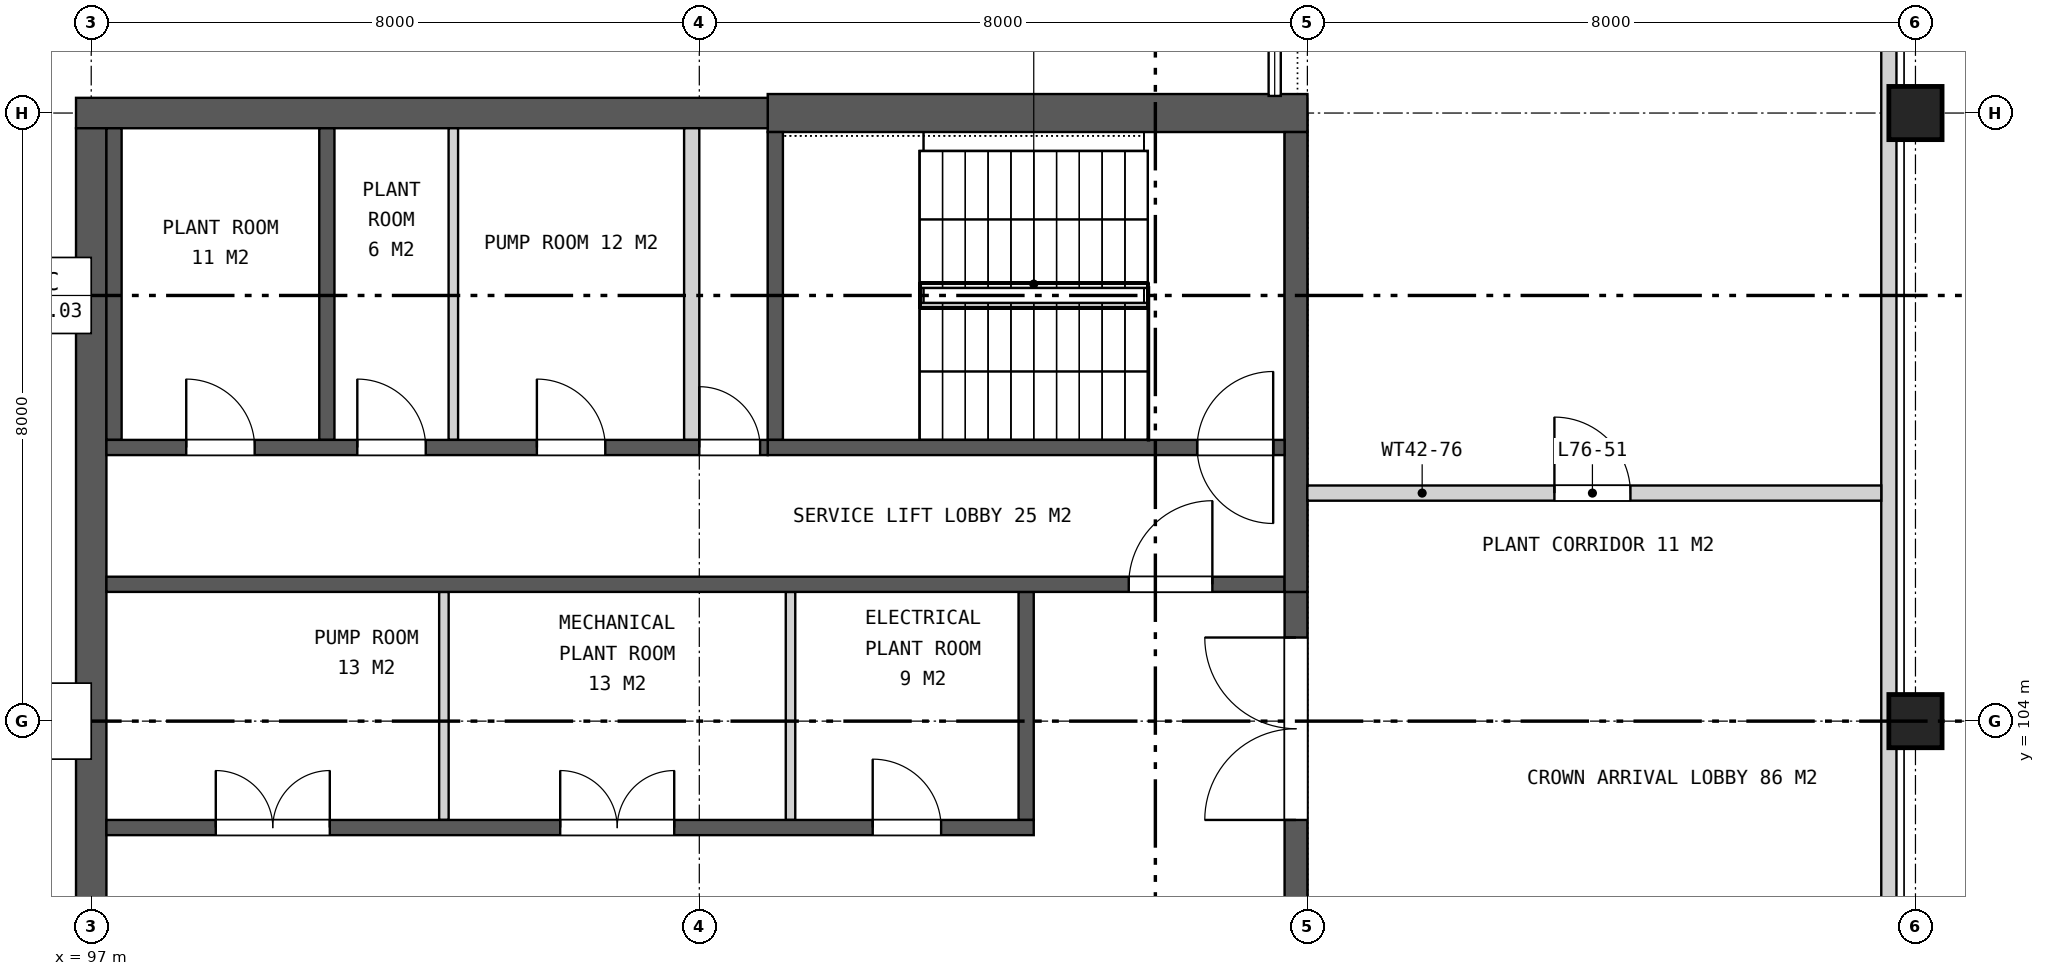
"""IFC4 building model, lengths in metres.
Left out: names, types, materials, properties, quantities, classifications, styles, units other than length and angle.
Written with IfcOpenShell. Run it as: python <this file> out.ifc"""

import sys

from ifc_helpers import new_model, si_unit, direction, frame, frame_2d, origin, origin_2d, place, context, subcontext, project, spatial, rectangle, extrude, element, fill, save


model = new_model("IFC4")
c1 = context("Model", 3, precision=1e-05, world=origin(), true_north=direction((0.0, 1.0)))
c2 = subcontext(c1, "Body", "Model", "MODEL_VIEW")
j1 = project(units=[si_unit("LENGTHUNIT", "METRE"), si_unit("PLANEANGLEUNIT", "RADIAN")], contexts=[c1])
p1 = place(None, origin())
s1 = spatial("IfcSite", under=j1, at=p1, CompositionType="ELEMENT")
p2 = place(p1, origin())
s2 = spatial("IfcBuilding", under=s1, at=p2, CompositionType="ELEMENT")
p3 = place(p2, frame((0.0, 0.0, 349.1)))
s3 = spatial("IfcBuildingStorey", under=s2, at=p3, CompositionType="ELEMENT", Elevation=349.1)
for number, where, z_axis, x_axis in (
    (1, (121.0, 104.0, 0.0), (0.0, 0.0, 1.0), (1.0, 0.0, 0.0)),
    (2, (121.0, 112.0, 0.0), (0.0, 0.0, 1.0), (1.0, 0.0, 0.0)),
):
    element("IfcColumn", number, at=place(p3, frame(where, z_axis=z_axis, x_axis=x_axis)), inside=s3, PredefinedType="COLUMN", context=c2, shape_type="SweptSolid", body=[
        extrude(rectangle(XDim=0.7, YDim=0.7, at=origin_2d()), origin(), (0.0, 0.0, 1.0), 10.23),
    ])
p4 = place(p3, frame((113.0, 112.0, 0.0), z_axis=(0.0, 0.0, 1.0), x_axis=(-1.0, 0.0, 0.0)))
e3 = element("IfcWall", 3, at=p4, inside=s3, PredefinedType="SHEAR", context=c2, shape_type="SweptSolid", body=[
    extrude(rectangle(XDim=7.1, YDim=0.5, at=frame_2d((3.55, 0.0))), origin(), (0.0, 0.0, 1.0), 12.0),
])
p5 = place(p3, frame((105.9, 112.0, 0.0), z_axis=(0.0, 0.0, 1.0), x_axis=(-1.0, 0.0, 0.0)))
e4 = element("IfcWall", 4, at=p5, inside=s3, PredefinedType="SHEAR", context=c2, shape_type="SweptSolid", body=[
    extrude(rectangle(XDim=9.1, YDim=0.4, at=frame_2d((4.55, 0.0))), origin(), (0.0, 0.0, 1.0), 12.0),
])
p6 = place(p3, frame((97.0, 111.8, 0.0), z_axis=(0.0, 0.0, 1.0), x_axis=(0.0, -1.0, 0.0)))
e5 = element("IfcWall", 5, at=p6, inside=s3, PredefinedType="SHEAR", context=c2, shape_type="SweptSolid", body=[
    extrude(rectangle(XDim=23.6, YDim=0.4, at=frame_2d((11.8, 0.0))), origin(), (0.0, 0.0, 1.0), 12.0),
])
p7 = place(p3, frame((112.85, 105.7, 0.0), z_axis=(0.0, 0.0, 1.0), x_axis=(0.0, -1.0, 0.0)))
e6 = element("IfcWall", 6, at=p7, inside=s3, PredefinedType="SHEAR", context=c2, shape_type="SweptSolid", body=[
    extrude(rectangle(XDim=11.4, YDim=0.3, at=frame_2d((5.7, 0.0))), origin(), (0.0, 0.0, 1.0), 12.0),
])
p8 = place(p7, frame((0.6, 0.0, 0.0)))
e7 = element("IfcOpeningElement", 7, at=p8, cuts=e6, PredefinedType="OPENING", context=c2, shape_type="SweptSolid", body=[
    extrude(rectangle(XDim=2.4, YDim=2.4, at=frame_2d((1.2, 1.2))), frame((0.0, 0.16, 0.0), z_axis=(0.0, -1.0, 0.0), x_axis=(1.0, 0.0, 0.0)), (0.0, 0.0, 1.0), 0.32),
])
p9 = place(p7, frame((4.5, 0.0, 0.0)))
e8 = element("IfcOpeningElement", 8, at=p9, cuts=e6, PredefinedType="OPENING", context=c2, shape_type="SweptSolid", body=[
    extrude(rectangle(XDim=2.4, YDim=2.4, at=frame_2d((1.2, 1.2))), frame((0.0, 0.16, 0.0), z_axis=(0.0, -1.0, 0.0), x_axis=(1.0, 0.0, 0.0)), (0.0, 0.0, 1.0), 0.32),
])
p10 = place(p7, frame((8.4, 0.0, 0.0)))
e9 = element("IfcOpeningElement", 9, at=p10, cuts=e6, PredefinedType="OPENING", context=c2, shape_type="SweptSolid", body=[
    extrude(rectangle(XDim=2.4, YDim=2.4, at=frame_2d((1.2, 1.2))), frame((0.0, 0.16, 0.0), z_axis=(0.0, -1.0, 0.0), x_axis=(1.0, 0.0, 0.0)), (0.0, 0.0, 1.0), 0.32),
])
p11 = place(p3, frame((109.3, 105.7, 0.0), z_axis=(0.0, 0.0, 1.0), x_axis=(0.0, -1.0, 0.0)))
e10 = element("IfcWall", 10, at=p11, inside=s3, PredefinedType="SHEAR", context=c2, shape_type="SweptSolid", body=[
    extrude(rectangle(XDim=3.0, YDim=0.2, at=frame_2d((1.5, 0.0))), origin(), (0.0, 0.0, 1.0), 9.2),
])
for number, where, z_axis, x_axis in (
    (11, (106.2, 105.7, 0.0), (0.0, 0.0, 1.0), (0.0, -1.0, 0.0)),
    (12, (101.64, 105.7, 0.0), (0.0, 0.0, 1.0), (0.0, -1.0, 0.0)),
):
    element("IfcWall", number, at=place(p3, frame(where, z_axis=z_axis, x_axis=x_axis)), inside=s3, PredefinedType="PARTITIONING", context=c2, shape_type="SweptSolid", body=[
        extrude(rectangle(XDim=3.0, YDim=0.125, at=frame_2d((1.5, 0.0))), origin(), (0.0, 0.0, 1.0), 9.2),
    ])
p12 = place(p3, frame((109.4, 102.6, 0.0), z_axis=(0.0, 0.0, 1.0), x_axis=(-1.0, 0.0, 0.0)))
e13 = element("IfcWall", 13, at=p12, inside=s3, PredefinedType="SHEAR", context=c2, shape_type="SweptSolid", body=[
    extrude(rectangle(XDim=12.2, YDim=0.2, at=frame_2d((6.1, 0.0))), origin(), (0.0, 0.0, 1.0), 9.2),
])
p13 = place(p12, frame((1.219, 0.0, 0.0)))
e14 = element("IfcOpeningElement", 14, at=p13, cuts=e13, PredefinedType="OPENING", context=c2, shape_type="SweptSolid", body=[
    extrude(rectangle(XDim=0.9, YDim=2.1, at=frame_2d((0.45, 1.05))), frame((0.0, 0.11, 0.0), z_axis=(0.0, -1.0, 0.0), x_axis=(1.0, 0.0, 0.0)), (0.0, 0.0, 1.0), 0.22),
])
p14 = place(p12, frame((4.73, 0.0, 0.0)))
e15 = element("IfcOpeningElement", 15, at=p14, cuts=e13, PredefinedType="OPENING", context=c2, shape_type="SweptSolid", body=[
    extrude(rectangle(XDim=1.5, YDim=2.1, at=frame_2d((0.75, 1.05))), frame((0.0, 0.11, 0.0), z_axis=(0.0, -1.0, 0.0), x_axis=(1.0, 0.0, 0.0)), (0.0, 0.0, 1.0), 0.22),
])
p15 = place(p12, frame((9.261, 0.0, 0.0)))
e16 = element("IfcOpeningElement", 16, at=p15, cuts=e13, PredefinedType="OPENING", context=c2, shape_type="SweptSolid", body=[
    extrude(rectangle(XDim=1.5, YDim=2.1, at=frame_2d((0.75, 1.05))), frame((0.0, 0.11, 0.0), z_axis=(0.0, -1.0, 0.0), x_axis=(1.0, 0.0, 0.0)), (0.0, 0.0, 1.0), 0.22),
])
p16 = place(p3, frame((112.7, 105.8, 0.0), z_axis=(0.0, 0.0, 1.0), x_axis=(-1.0, 0.0, 0.0)))
e17 = element("IfcWall", 17, at=p16, inside=s3, PredefinedType="SHEAR", context=c2, shape_type="SweptSolid", body=[
    extrude(rectangle(XDim=15.5, YDim=0.2, at=frame_2d((7.75, 0.0))), origin(), (0.0, 0.0, 1.0), 9.2),
])
p17 = place(p16, frame((0.95, 0.0, 0.0)))
e18 = element("IfcOpeningElement", 18, at=p17, cuts=e17, PredefinedType="OPENING", context=c2, shape_type="SweptSolid", body=[
    extrude(rectangle(XDim=1.1, YDim=2.1, at=frame_2d((0.55, 1.05))), frame((0.0, 0.11, 0.0), z_axis=(0.0, -1.0, 0.0), x_axis=(1.0, 0.0, 0.0)), (0.0, 0.0, 1.0), 0.22),
])
p18 = place(p3, frame((112.85, 111.75, 0.0), z_axis=(0.0, 0.0, 1.0), x_axis=(0.0, -1.0, 0.0)))
e19 = element("IfcWall", 19, at=p18, inside=s3, PredefinedType="SHEAR", context=c2, shape_type="SweptSolid", body=[
    extrude(rectangle(XDim=6.05, YDim=0.3, at=frame_2d((3.025, 0.0))), origin(), (0.0, 0.0, 1.0), 12.0),
])
p19 = place(p3, frame((106.0, 111.75, 0.0), z_axis=(0.0, 0.0, 1.0), x_axis=(0.0, -1.0, 0.0)))
e20 = element("IfcWall", 20, at=p19, inside=s3, PredefinedType="SHEAR", context=c2, shape_type="SweptSolid", body=[
    extrude(rectangle(XDim=4.05, YDim=0.2, at=frame_2d((2.025, 0.0))), origin(), (0.0, 0.0, 1.0), 11.6),
])
for number, where, z_axis, x_axis in (
    (21, (100.1, 111.8, 0.0), (0.0, 0.0, 1.0), (0.0, -1.0, 0.0)),
    (22, (97.3, 111.8, 0.0), (0.0, 0.0, 1.0), (0.0, -1.0, 0.0)),
):
    element("IfcWall", number, at=place(p3, frame(where, z_axis=z_axis, x_axis=x_axis)), inside=s3, PredefinedType="SHEAR", context=c2, shape_type="SweptSolid", body=[
        extrude(rectangle(XDim=4.1, YDim=0.2, at=frame_2d((2.05, 0.0))), origin(), (0.0, 0.0, 1.0), 9.2),
    ])
p20 = place(p3, frame((104.9, 111.8, 0.0), z_axis=(0.0, 0.0, 1.0), x_axis=(0.0, -1.0, 0.0)))
e23 = element("IfcWall", 23, at=p20, inside=s3, PredefinedType="PARTITIONING", context=c2, shape_type="SweptSolid", body=[
    extrude(rectangle(XDim=4.1, YDim=0.2, at=frame_2d((2.05, 0.0))), origin(), (0.0, 0.0, 1.0), 9.2),
])
p21 = place(p3, frame((101.764, 111.8, 0.0), z_axis=(0.0, 0.0, 1.0), x_axis=(0.0, -1.0, 0.0)))
e24 = element("IfcWall", 24, at=p21, inside=s3, PredefinedType="PARTITIONING", context=c2, shape_type="SweptSolid", body=[
    extrude(rectangle(XDim=4.1, YDim=0.125, at=frame_2d((2.05, 0.0))), origin(), (0.0, 0.0, 1.0), 9.2),
])
p22 = place(p3, frame((112.7, 107.6, 0.0), z_axis=(0.0, 0.0, 1.0), x_axis=(-1.0, 0.0, 0.0)))
e25 = element("IfcWall", 25, at=p22, inside=s3, PredefinedType="SHEAR", context=c2, shape_type="SweptSolid", body=[
    extrude(rectangle(XDim=6.8, YDim=0.2, at=frame_2d((3.4, 0.0))), origin(), (0.0, 0.0, 1.0), 11.6),
])
p23 = place(p22, frame((0.15, 0.0, 0.0)))
e26 = element("IfcOpeningElement", 26, at=p23, cuts=e25, PredefinedType="OPENING", context=c2, shape_type="SweptSolid", body=[
    extrude(rectangle(XDim=1.0, YDim=2.1, at=frame_2d((0.5, 1.05))), frame((0.0, 0.11, 0.0), z_axis=(0.0, -1.0, 0.0), x_axis=(1.0, 0.0, 0.0)), (0.0, 0.0, 1.0), 0.22),
])
p24 = place(p22, frame((0.15, 0.0, 9.2)))
e27 = element("IfcOpeningElement", 27, at=p24, cuts=e25, PredefinedType="OPENING", context=c2, shape_type="SweptSolid", body=[
    extrude(rectangle(XDim=1.0, YDim=2.1, at=frame_2d((0.5, 1.05))), frame((0.0, 0.11, 0.0), z_axis=(0.0, -1.0, 0.0), x_axis=(1.0, 0.0, 0.0)), (0.0, 0.0, 1.0), 0.22),
])
p25 = place(p3, frame((105.9, 107.6, 0.0), z_axis=(0.0, 0.0, 1.0), x_axis=(-1.0, 0.0, 0.0)))
e28 = element("IfcWall", 28, at=p25, inside=s3, PredefinedType="SHEAR", context=c2, shape_type="SweptSolid", body=[
    extrude(rectangle(XDim=8.7, YDim=0.2, at=frame_2d((4.35, 0.0))), origin(), (0.0, 0.0, 1.0), 9.2),
])
p26 = place(p25, frame((0.1, 0.0, 0.0)))
e29 = element("IfcOpeningElement", 29, at=p26, cuts=e28, PredefinedType="OPENING", context=c2, shape_type="SweptSolid", body=[
    extrude(rectangle(XDim=0.8, YDim=2.1, at=frame_2d((0.4, 1.05))), frame((0.0, 0.11, 0.0), z_axis=(0.0, -1.0, 0.0), x_axis=(1.0, 0.0, 0.0)), (0.0, 0.0, 1.0), 0.22),
])
p27 = place(p25, frame((2.137, 0.0, 0.0)))
e30 = element("IfcOpeningElement", 30, at=p27, cuts=e28, PredefinedType="OPENING", context=c2, shape_type="SweptSolid", body=[
    extrude(rectangle(XDim=0.9, YDim=2.1, at=frame_2d((0.45, 1.05))), frame((0.0, 0.11, 0.0), z_axis=(0.0, -1.0, 0.0), x_axis=(1.0, 0.0, 0.0)), (0.0, 0.0, 1.0), 0.22),
])
p28 = place(p25, frame((4.499, 0.0, 0.0)))
e31 = element("IfcOpeningElement", 31, at=p28, cuts=e28, PredefinedType="OPENING", context=c2, shape_type="SweptSolid", body=[
    extrude(rectangle(XDim=0.9, YDim=2.1, at=frame_2d((0.45, 1.05))), frame((0.0, 0.11, 0.0), z_axis=(0.0, -1.0, 0.0), x_axis=(1.0, 0.0, 0.0)), (0.0, 0.0, 1.0), 0.22),
])
p29 = place(p25, frame((6.75, 0.0, 0.0)))
e32 = element("IfcOpeningElement", 32, at=p29, cuts=e28, PredefinedType="OPENING", context=c2, shape_type="SweptSolid", body=[
    extrude(rectangle(XDim=0.9, YDim=2.1, at=frame_2d((0.45, 1.05))), frame((0.0, 0.11, 0.0), z_axis=(0.0, -1.0, 0.0), x_axis=(1.0, 0.0, 0.0)), (0.0, 0.0, 1.0), 0.22),
])
p30 = place(p3, frame((120.65, 71.73, 0.0), z_axis=(0.0, 0.0, 1.0), x_axis=(0.0, 1.0, 0.0)))
e33 = element("IfcWall", 33, at=p30, inside=s3, PredefinedType="SOLIDWALL", context=c2, shape_type="SweptSolid", body=[
    extrude(rectangle(XDim=56.54, YDim=0.2, at=frame_2d((28.27, 0.0))), origin(), (0.0, 0.0, 1.0), 11.6),
])
p31 = place(p30, frame((27.32, 0.0, 0.0)))
e34 = element("IfcOpeningElement", 34, at=p31, cuts=e33, PredefinedType="OPENING", context=c2, shape_type="SweptSolid", body=[
    extrude(rectangle(XDim=1.8, YDim=2.1, at=frame_2d((0.9, 1.05))), frame((0.0, 0.11, 0.0), z_axis=(0.0, -1.0, 0.0), x_axis=(1.0, 0.0, 0.0)), (0.0, 0.0, 1.0), 0.22),
])
p32 = place(p3, frame((113.0, 107.0, 0.0), z_axis=(0.0, 0.0, 1.0), x_axis=(1.0, 0.0, 0.0)))
e35 = element("IfcWall", 35, at=p32, inside=s3, PredefinedType="SOLIDWALL", context=c2, shape_type="SweptSolid", body=[
    extrude(rectangle(XDim=7.55, YDim=0.2, at=frame_2d((3.775, 0.0))), origin(), (0.0, 0.0, 1.0), 11.6),
])
p33 = place(p32, frame((3.25, 0.0, 0.0)))
e36 = element("IfcOpeningElement", 36, at=p33, cuts=e35, PredefinedType="OPENING", context=c2, shape_type="SweptSolid", body=[
    extrude(rectangle(XDim=1.0, YDim=2.1, at=frame_2d((0.5, 1.05))), frame((0.0, 0.11, 0.0), z_axis=(0.0, -1.0, 0.0), x_axis=(1.0, 0.0, 0.0)), (0.0, 0.0, 1.0), 0.22),
])
p34 = place(p8, frame((2.4, 0.0, 0.0), z_axis=(0.0, 0.0, 1.0), x_axis=(-1.0, 0.0, 0.0)))
e37 = element("IfcDoor", 37, at=p34, inside=s3, OperationType="DOUBLE_DOOR_SINGLE_SWING", PredefinedType="DOOR", context=c2, shape_type="SweptSolid", body=[
    extrude(rectangle(XDim=2.4, YDim=2.4, at=frame_2d((1.2, 1.2))), frame((0.0, 0.025, 0.0), z_axis=(0.0, -1.0, 0.0), x_axis=(1.0, 0.0, 0.0)), (0.0, 0.0, 1.0), 0.05),
])
fill(e7, e37)
p35 = place(p13, frame((0.9, 0.0, 0.0), z_axis=(0.0, 0.0, 1.0), x_axis=(-1.0, 0.0, 0.0)))
e38 = element("IfcDoor", 38, at=p35, inside=s3, OperationType="SINGLE_SWING_LEFT", PredefinedType="DOOR", context=c2, shape_type="SweptSolid", body=[
    extrude(rectangle(XDim=0.9, YDim=2.1, at=frame_2d((0.45, 1.05))), frame((0.0, 0.025, 0.0), z_axis=(0.0, -1.0, 0.0), x_axis=(1.0, 0.0, 0.0)), (0.0, 0.0, 1.0), 0.05),
])
fill(e14, e38)
p36 = place(p14, frame((1.5, 0.0, 0.0), z_axis=(0.0, 0.0, 1.0), x_axis=(-1.0, 0.0, 0.0)))
e39 = element("IfcDoor", 39, at=p36, inside=s3, OperationType="DOUBLE_DOOR_SINGLE_SWING", PredefinedType="DOOR", context=c2, shape_type="SweptSolid", body=[
    extrude(rectangle(XDim=1.5, YDim=2.1, at=frame_2d((0.75, 1.05))), frame((0.0, 0.025, 0.0), z_axis=(0.0, -1.0, 0.0), x_axis=(1.0, 0.0, 0.0)), (0.0, 0.0, 1.0), 0.05),
])
fill(e15, e39)
p37 = place(p15, frame((1.5, 0.0, 0.0), z_axis=(0.0, 0.0, 1.0), x_axis=(-1.0, 0.0, 0.0)))
e40 = element("IfcDoor", 40, at=p37, inside=s3, OperationType="DOUBLE_DOOR_SINGLE_SWING", PredefinedType="DOOR", context=c2, shape_type="SweptSolid", body=[
    extrude(rectangle(XDim=1.5, YDim=2.1, at=frame_2d((0.75, 1.05))), frame((0.0, 0.025, 0.0), z_axis=(0.0, -1.0, 0.0), x_axis=(1.0, 0.0, 0.0)), (0.0, 0.0, 1.0), 0.05),
])
fill(e16, e40)
p38 = place(p17, frame((1.1, 0.0, 0.0), z_axis=(0.0, 0.0, 1.0), x_axis=(-1.0, 0.0, 0.0)))
e41 = element("IfcDoor", 41, at=p38, inside=s3, OperationType="SINGLE_SWING_RIGHT", PredefinedType="DOOR", context=c2, shape_type="SweptSolid", body=[
    extrude(rectangle(XDim=1.1, YDim=2.1, at=frame_2d((0.55, 1.05))), frame((0.0, 0.025, 0.0), z_axis=(0.0, -1.0, 0.0), x_axis=(1.0, 0.0, 0.0)), (0.0, 0.0, 1.0), 0.05),
])
fill(e18, e41)
p39 = place(p23, frame((1.0, 0.0, 0.0), z_axis=(0.0, 0.0, 1.0), x_axis=(-1.0, 0.0, 0.0)))
e42 = element("IfcDoor", 42, at=p39, inside=s3, OperationType="SINGLE_SWING_RIGHT", PredefinedType="DOOR", context=c2, shape_type="SweptSolid", body=[
    extrude(rectangle(XDim=1.0, YDim=2.1, at=frame_2d((0.5, 1.05))), frame((0.0, 0.025, 0.0), z_axis=(0.0, -1.0, 0.0), x_axis=(1.0, 0.0, 0.0)), (0.0, 0.0, 1.0), 0.05),
])
fill(e26, e42)
p40 = place(p24, origin())
e43 = element("IfcDoor", 43, at=p40, inside=s3, OperationType="SINGLE_SWING_LEFT", PredefinedType="DOOR", context=c2, shape_type="SweptSolid", body=[
    extrude(rectangle(XDim=1.0, YDim=2.1, at=frame_2d((0.5, 1.05))), frame((0.0, 0.025, 0.0), z_axis=(0.0, -1.0, 0.0), x_axis=(1.0, 0.0, 0.0)), (0.0, 0.0, 1.0), 0.05),
])
fill(e27, e43)
p41 = place(p26, frame((0.8, 0.0, 0.0), z_axis=(0.0, 0.0, 1.0), x_axis=(-1.0, 0.0, 0.0)))
e44 = element("IfcDoor", 44, at=p41, inside=s3, OperationType="SINGLE_SWING_LEFT", PredefinedType="DOOR", context=c2, shape_type="SweptSolid", body=[
    extrude(rectangle(XDim=0.8, YDim=2.1, at=frame_2d((0.4, 1.05))), frame((0.0, 0.025, 0.0), z_axis=(0.0, -1.0, 0.0), x_axis=(1.0, 0.0, 0.0)), (0.0, 0.0, 1.0), 0.05),
])
fill(e29, e44)
p42 = place(p27, frame((0.9, 0.0, 0.0), z_axis=(0.0, 0.0, 1.0), x_axis=(-1.0, 0.0, 0.0)))
e45 = element("IfcDoor", 45, at=p42, inside=s3, OperationType="SINGLE_SWING_LEFT", PredefinedType="DOOR", context=c2, shape_type="SweptSolid", body=[
    extrude(rectangle(XDim=0.9, YDim=2.1, at=frame_2d((0.45, 1.05))), frame((0.0, 0.025, 0.0), z_axis=(0.0, -1.0, 0.0), x_axis=(1.0, 0.0, 0.0)), (0.0, 0.0, 1.0), 0.05),
])
fill(e30, e45)
p43 = place(p28, frame((0.9, 0.0, 0.0), z_axis=(0.0, 0.0, 1.0), x_axis=(-1.0, 0.0, 0.0)))
e46 = element("IfcDoor", 46, at=p43, inside=s3, OperationType="SINGLE_SWING_LEFT", PredefinedType="DOOR", context=c2, shape_type="SweptSolid", body=[
    extrude(rectangle(XDim=0.9, YDim=2.1, at=frame_2d((0.45, 1.05))), frame((0.0, 0.025, 0.0), z_axis=(0.0, -1.0, 0.0), x_axis=(1.0, 0.0, 0.0)), (0.0, 0.0, 1.0), 0.05),
])
fill(e31, e46)
p44 = place(p29, frame((0.9, 0.0, 0.0), z_axis=(0.0, 0.0, 1.0), x_axis=(-1.0, 0.0, 0.0)))
e47 = element("IfcDoor", 47, at=p44, inside=s3, OperationType="SINGLE_SWING_LEFT", PredefinedType="DOOR", context=c2, shape_type="SweptSolid", body=[
    extrude(rectangle(XDim=0.9, YDim=2.1, at=frame_2d((0.45, 1.05))), frame((0.0, 0.025, 0.0), z_axis=(0.0, -1.0, 0.0), x_axis=(1.0, 0.0, 0.0)), (0.0, 0.0, 1.0), 0.05),
])
fill(e32, e47)
p45 = place(p33, origin())
e48 = element("IfcDoor", 48, at=p45, inside=s3, OperationType="SINGLE_SWING_LEFT", PredefinedType="DOOR", context=c2, shape_type="SweptSolid", body=[
    extrude(rectangle(XDim=1.0, YDim=2.1, at=frame_2d((0.5, 1.05))), frame((0.0, 0.025, 0.0), z_axis=(0.0, -1.0, 0.0), x_axis=(1.0, 0.0, 0.0)), (0.0, 0.0, 1.0), 0.05),
])
fill(e36, e48)
save(model, sys.argv[1])
